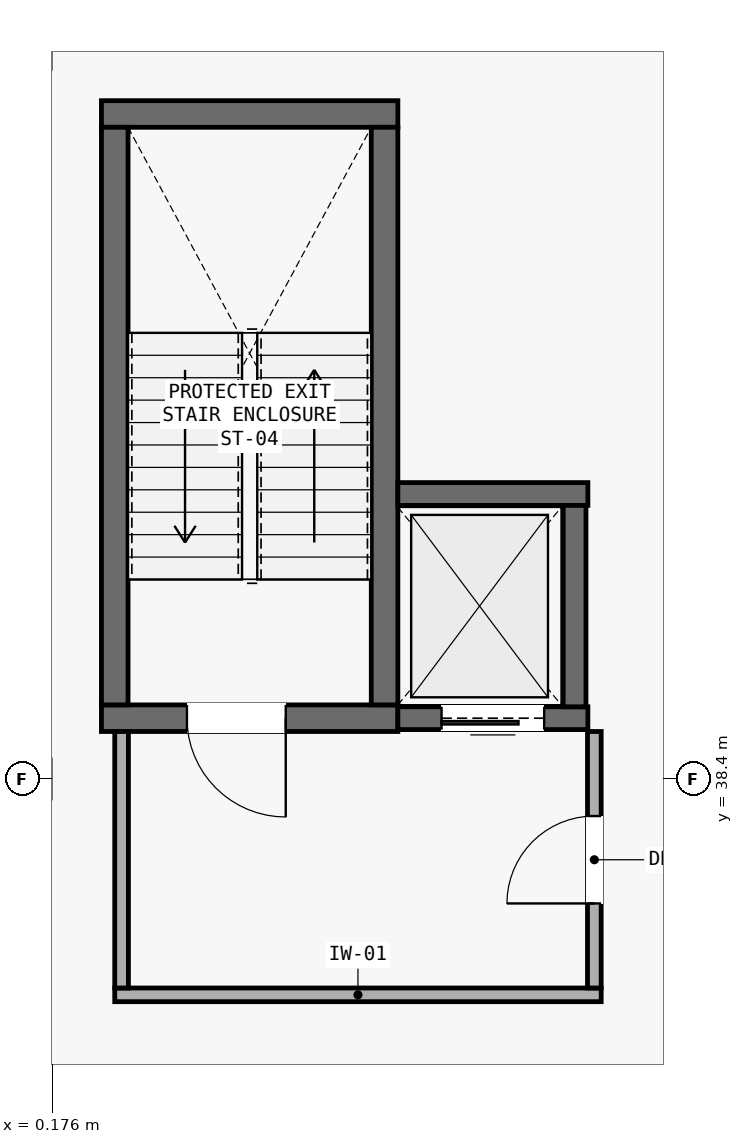
"""IFC4 building model, lengths in metres.
Left out: names, types, materials, properties, quantities, classifications, styles, units other than length and angle.
Written with IfcOpenShell. Run it as: python <this file> out.ifc"""

import sys

from ifc_helpers import new_model, si_unit, direction, frame, frame_2d, origin, place, context, subcontext, project, spatial, rectangle, extrude, element, fill, save


model = new_model("IFC4")
c1 = context("Model", 3, precision=1e-05, world=origin(), true_north=direction((0.0, 1.0)))
c2 = subcontext(c1, "Body", "Model", "MODEL_VIEW")
j1 = project(units=[si_unit("LENGTHUNIT", "METRE"), si_unit("PLANEANGLEUNIT", "RADIAN")], contexts=[c1])
p1 = place(None, origin())
s1 = spatial("IfcSite", under=j1, at=p1, CompositionType="ELEMENT")
p2 = place(p1, origin())
s2 = spatial("IfcBuilding", under=s1, at=p2, CompositionType="ELEMENT")
p3 = place(p2, frame((0.0, 0.0, 17.85)))
s3 = spatial("IfcBuildingStorey", under=s2, at=p3, CompositionType="ELEMENT", Elevation=17.85)
p4 = place(p3, frame((0.825, 39.2, 0.0), z_axis=(0.0, 0.0, 1.0), x_axis=(1.0, 0.0, 0.0)))
e1 = element("IfcWall", 1, at=p4, inside=s3, PredefinedType="SHEAR", context=c2, shape_type="SweptSolid", body=[
    extrude(rectangle(XDim=3.9, YDim=0.35, at=frame_2d((1.95, 0.0))), origin(), (0.0, 0.0, 1.0), 3.99),
])
p5 = place(p4, frame((1.125, 0.0, 0.0)))
e2 = element("IfcOpeningElement", 2, at=p5, cuts=e1, PredefinedType="OPENING", context=c2, shape_type="SweptSolid", body=[
    extrude(rectangle(XDim=1.3, YDim=2.15, at=frame_2d((0.65, 1.075))), frame((0.0, 0.185, 0.0), z_axis=(0.0, -1.0, 0.0), x_axis=(1.0, 0.0, 0.0)), (0.0, 0.0, 1.0), 0.37),
])
p6 = place(p3, frame((0.825, 47.15, 0.0), z_axis=(0.0, 0.0, 1.0), x_axis=(1.0, 0.0, 0.0)))
e3 = element("IfcWall", 3, at=p6, inside=s3, PredefinedType="SHEAR", context=c2, shape_type="SweptSolid", body=[
    extrude(rectangle(XDim=3.9, YDim=0.35, at=frame_2d((1.95, 0.0))), origin(), (0.0, 0.0, 1.0), 3.99),
])
for number, where, z_axis, x_axis in (
    (4, (1.0, 39.375, 0.0), (0.0, 0.0, 1.0), (0.0, 1.0, 0.0)),
    (5, (4.55, 39.375, 0.0), (0.0, 0.0, 1.0), (0.0, 1.0, 0.0)),
):
    element("IfcWall", number, at=place(p3, frame(where, z_axis=z_axis, x_axis=x_axis)), inside=s3, PredefinedType="SHEAR", context=c2, shape_type="SweptSolid", body=[
        extrude(rectangle(XDim=7.6, YDim=0.35, at=frame_2d((3.8, 0.0))), origin(), (0.0, 0.0, 1.0), 3.99),
    ])
p7 = place(p3, frame((4.725, 39.2, 0.0), z_axis=(0.0, 0.0, 1.0), x_axis=(1.0, 0.0, 0.0)))
e6 = element("IfcWall", 6, at=p7, inside=s3, PredefinedType="SHEAR", context=c2, shape_type="SweptSolid", body=[
    extrude(rectangle(XDim=2.5, YDim=0.3, at=frame_2d((1.25, 0.0))), origin(), (0.0, 0.0, 1.0), 3.99),
])
p8 = place(p7, frame((0.575, 0.0, 0.0)))
e7 = element("IfcOpeningElement", 7, at=p8, cuts=e6, PredefinedType="OPENING", context=c2, shape_type="SweptSolid", body=[
    extrude(rectangle(XDim=1.35, YDim=2.15, at=frame_2d((0.675, 1.075))), frame((0.0, 0.16, 0.0), z_axis=(0.0, -1.0, 0.0), x_axis=(1.0, 0.0, 0.0)), (0.0, 0.0, 1.0), 0.32),
])
p9 = place(p3, frame((4.725, 42.15, 0.0), z_axis=(0.0, 0.0, 1.0), x_axis=(1.0, 0.0, 0.0)))
e8 = element("IfcWall", 8, at=p9, inside=s3, PredefinedType="SHEAR", context=c2, shape_type="SweptSolid", body=[
    extrude(rectangle(XDim=2.5, YDim=0.3, at=frame_2d((1.25, 0.0))), origin(), (0.0, 0.0, 1.0), 3.99),
])
p10 = place(p3, frame((7.05, 39.35, 0.0), z_axis=(0.0, 0.0, 1.0), x_axis=(0.0, 1.0, 0.0)))
e9 = element("IfcWall", 9, at=p10, inside=s3, PredefinedType="SHEAR", context=c2, shape_type="SweptSolid", body=[
    extrude(rectangle(XDim=2.65, YDim=0.3, at=frame_2d((1.325, 0.0))), origin(), (0.0, 0.0, 1.0), 3.99),
])
p11 = place(p3, frame((1.0, 35.56, 0.0), z_axis=(0.0, 0.0, 1.0), x_axis=(1.0, 0.0, 0.0)))
e10 = element("IfcWall", 10, at=p11, inside=s3, PredefinedType="PARTITIONING", context=c2, shape_type="SweptSolid", body=[
    extrude(rectangle(XDim=6.4, YDim=0.18, at=frame_2d((3.2, 0.0))), origin(), (0.0, 0.0, 1.0), 3.99),
])
p12 = place(p3, frame((1.09, 35.65, 0.0), z_axis=(0.0, 0.0, 1.0), x_axis=(0.0, 1.0, 0.0)))
e11 = element("IfcWall", 11, at=p12, inside=s3, PredefinedType="PARTITIONING", context=c2, shape_type="SweptSolid", body=[
    extrude(rectangle(XDim=3.375, YDim=0.18, at=frame_2d((1.688, 0.0))), origin(), (0.0, 0.0, 1.0), 3.99),
])
p13 = place(p3, frame((7.31, 35.65, 0.0), z_axis=(0.0, 0.0, 1.0), x_axis=(0.0, 1.0, 0.0)))
e12 = element("IfcWall", 12, at=p13, inside=s3, PredefinedType="PARTITIONING", context=c2, shape_type="SweptSolid", body=[
    extrude(rectangle(XDim=3.375, YDim=0.18, at=frame_2d((1.688, 0.0))), origin(), (0.0, 0.0, 1.0), 3.99),
])
p14 = place(p13, frame((1.113, 0.0, 0.0)))
e13 = element("IfcOpeningElement", 13, at=p14, cuts=e12, PredefinedType="OPENING", context=c2, shape_type="SweptSolid", body=[
    extrude(rectangle(XDim=1.15, YDim=2.15, at=frame_2d((0.575, 1.075))), frame((0.0, 0.1, 0.0), z_axis=(0.0, -1.0, 0.0), x_axis=(1.0, 0.0, 0.0)), (0.0, 0.0, 1.0), 0.2),
])
p15 = place(p5, frame((1.3, 0.0, 0.0), z_axis=(0.0, 0.0, 1.0), x_axis=(-1.0, 0.0, 0.0)))
e14 = element("IfcDoor", 14, at=p15, inside=s3, OperationType="SINGLE_SWING_RIGHT", PredefinedType="DOOR", context=c2, shape_type="SweptSolid", body=[
    extrude(rectangle(XDim=1.3, YDim=2.15, at=frame_2d((0.65, 1.075))), frame((0.0, 0.025, 0.0), z_axis=(0.0, -1.0, 0.0), x_axis=(1.0, 0.0, 0.0)), (0.0, 0.0, 1.0), 0.05),
])
fill(e2, e14)
p16 = place(p8, frame((1.35, 0.0, 0.0), z_axis=(0.0, 0.0, 1.0), x_axis=(-1.0, 0.0, 0.0)))
e15 = element("IfcDoor", 15, at=p16, inside=s3, OperationType="SLIDING_TO_RIGHT", PredefinedType="DOOR", context=c2, shape_type="SweptSolid", body=[
    extrude(rectangle(XDim=1.35, YDim=2.15, at=frame_2d((0.675, 1.075))), frame((0.0, 0.025, 0.0), z_axis=(0.0, -1.0, 0.0), x_axis=(1.0, 0.0, 0.0)), (0.0, 0.0, 1.0), 0.05),
])
fill(e7, e15)
p17 = place(p14, origin())
e16 = element("IfcDoor", 16, at=p17, inside=s3, OperationType="SINGLE_SWING_LEFT", PredefinedType="DOOR", context=c2, shape_type="SweptSolid", body=[
    extrude(rectangle(XDim=1.15, YDim=2.15, at=frame_2d((0.575, 1.075))), frame((0.0, 0.025, 0.0), z_axis=(0.0, -1.0, 0.0), x_axis=(1.0, 0.0, 0.0)), (0.0, 0.0, 1.0), 0.05),
])
fill(e13, e16)
save(model, sys.argv[1])
